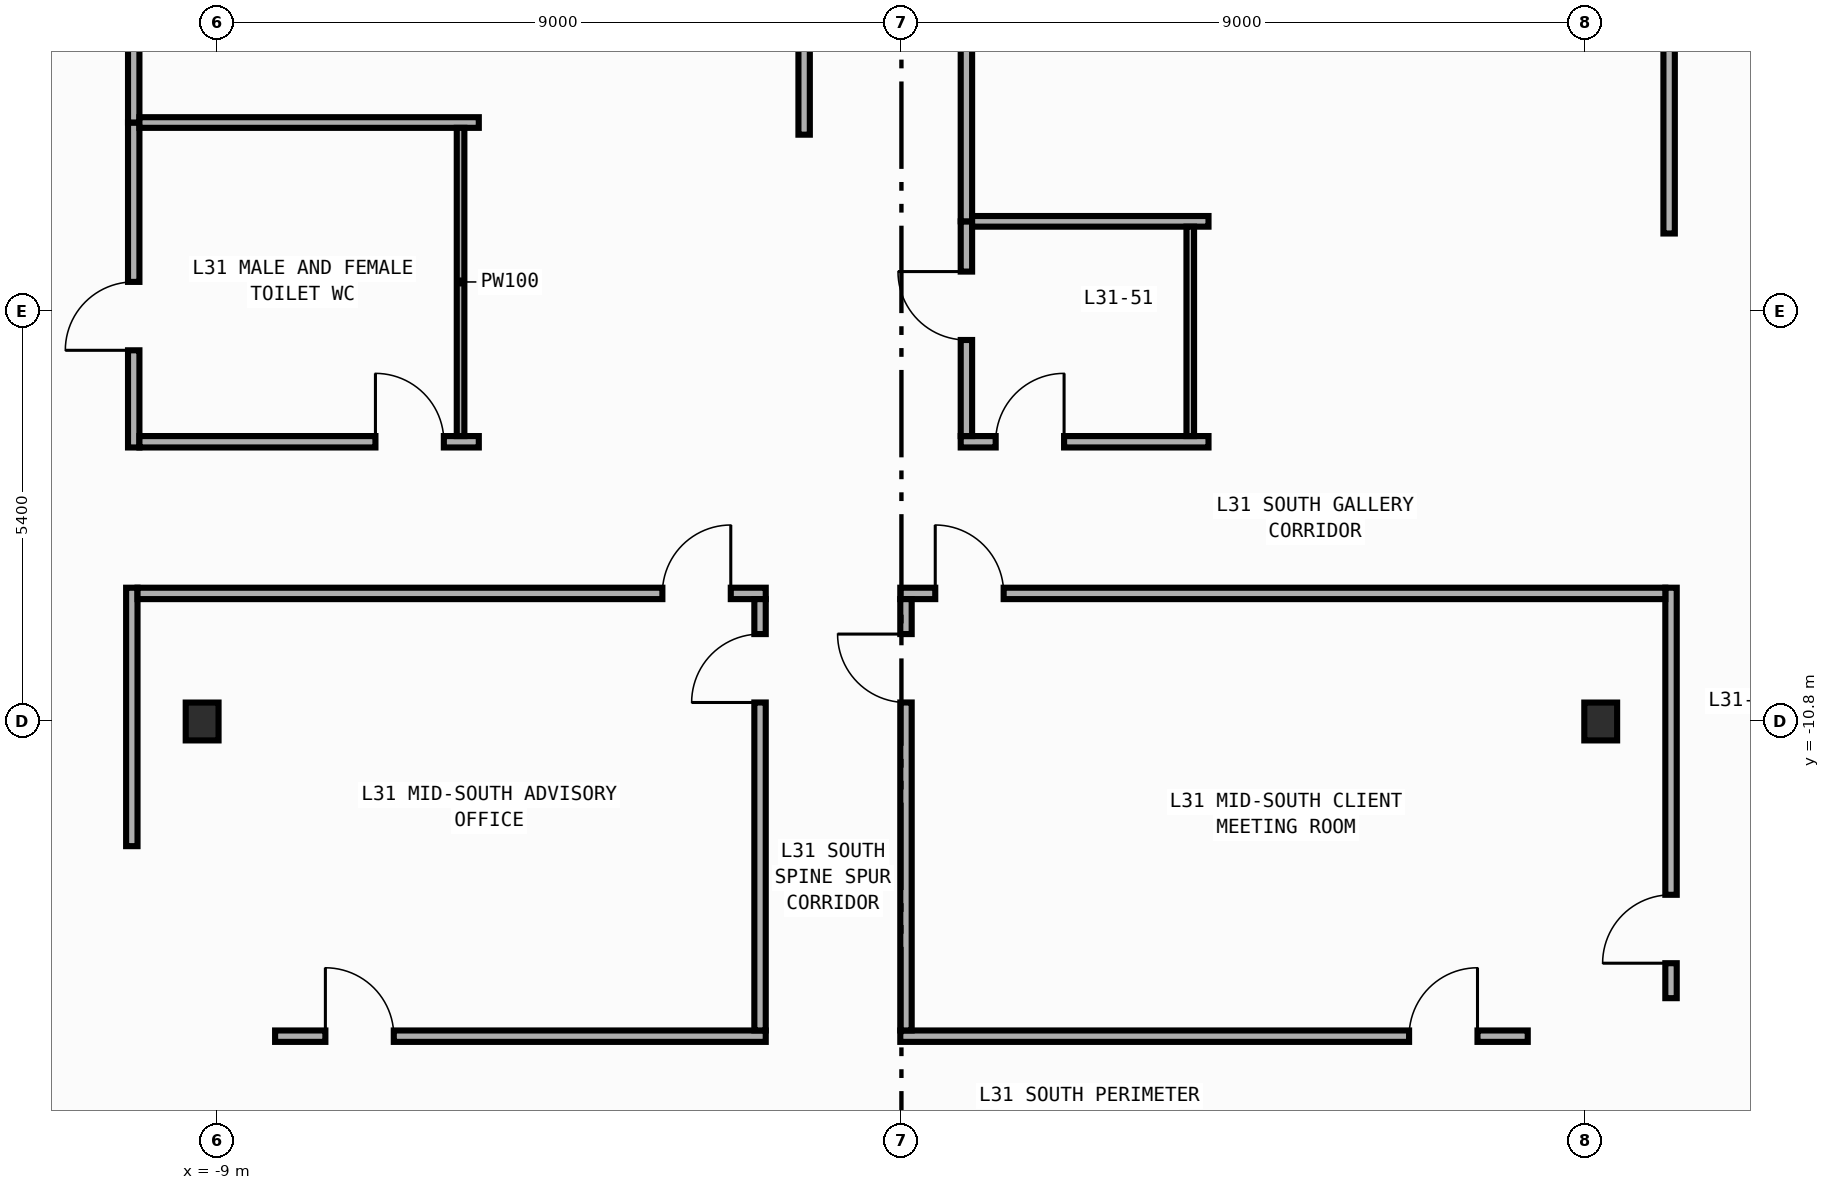
"""IFC4 building model, lengths in metres.
Left out: names, types, materials, properties, quantities, classifications, styles, units other than length and angle.
Written with IfcOpenShell. Run it as: python <this file> out.ifc"""

import sys

from ifc_helpers import new_model, si_unit, direction, frame, frame_2d, origin, origin_2d, place, context, subcontext, project, spatial, rectangle, i_section, extrude, element, fill, save


model = new_model("IFC4")
c1 = context("Model", 3, precision=1e-05, world=origin(), true_north=direction((0.0, 1.0)))
c2 = subcontext(c1, "Body", "Model", "MODEL_VIEW")
j1 = project(units=[si_unit("LENGTHUNIT", "METRE"), si_unit("PLANEANGLEUNIT", "RADIAN")], contexts=[c1])
p1 = place(None, origin())
s1 = spatial("IfcSite", under=j1, at=p1, CompositionType="ELEMENT")
p2 = place(p1, origin())
s2 = spatial("IfcBuilding", under=s1, at=p2, CompositionType="ELEMENT")
p3 = place(p2, frame((0.0, 0.0, 135.2)))
s3 = spatial("IfcBuildingStorey", under=s2, at=p3, CompositionType="ELEMENT", Elevation=135.2)
for number, where, z_axis, x_axis in (
    (1, (-9.2, -10.8, 0.0), (0.0, 0.0, 1.0), (1.0, 0.0, 0.0)),
    (2, (9.2, -10.8, 0.0), (0.0, 0.0, 1.0), (1.0, 0.0, 0.0)),
):
    element("IfcColumn", number, at=place(p3, frame(where, z_axis=z_axis, x_axis=x_axis)), inside=s3, PredefinedType="COLUMN", context=c2, shape_type="SweptSolid", body=[
        extrude(i_section(OverallWidth=0.432, OverallDepth=0.498, WebThickness=0.045, FlangeThickness=0.07, FilletRadius=0.022, at=origin_2d()), origin(), (0.0, 0.0, 1.0), 4.2),
    ])
p4 = place(p3, frame((-10.1, -7.195, 0.0), z_axis=(0.0, 0.0, 1.0), x_axis=(0.0, 1.0, 0.0)))
e3 = element("IfcWall", 3, at=p4, inside=s3, PredefinedType="PARTITIONING", context=c2, shape_type="SweptSolid", body=[
    extrude(rectangle(XDim=4.275, YDim=0.15, at=frame_2d((2.138, 0.0))), origin(), (0.0, 0.0, 1.0), 3.94),
])
p5 = place(p4, frame((1.278, 0.0, 0.0)))
e4 = element("IfcOpeningElement", 4, at=p5, cuts=e3, PredefinedType="OPENING", context=c2, shape_type="SweptSolid", body=[
    extrude(rectangle(XDim=0.9, YDim=2.15, at=frame_2d((0.45, 1.075))), frame((0.0, 0.085, 0.0), z_axis=(0.0, -1.0, 0.0), x_axis=(1.0, 0.0, 0.0)), (0.0, 0.0, 1.0), 0.17),
])
p6 = place(p3, frame((-10.1, -2.92, 0.0), z_axis=(0.0, 0.0, 1.0), x_axis=(0.0, 1.0, 0.0)))
e5 = element("IfcWall", 5, at=p6, inside=s3, PredefinedType="PARTITIONING", context=c2, shape_type="SweptSolid", body=[
    extrude(rectangle(XDim=8.915, YDim=0.15, at=frame_2d((4.458, 0.0))), origin(), (0.0, 0.0, 1.0), 3.94),
])
p7 = place(p6, frame((7.555, 0.0, 0.0)))
e6 = element("IfcOpeningElement", 6, at=p7, cuts=e5, PredefinedType="OPENING", context=c2, shape_type="SweptSolid", body=[
    extrude(rectangle(XDim=0.9, YDim=2.15, at=frame_2d((0.45, 1.075))), frame((0.0, 0.085, 0.0), z_axis=(0.0, -1.0, 0.0), x_axis=(1.0, 0.0, 0.0)), (0.0, 0.0, 1.0), 0.17),
])
p8 = place(p3, frame((-10.125, -12.44, 0.0), z_axis=(0.0, 0.0, 1.0), x_axis=(0.0, 1.0, 0.0)))
e7 = element("IfcWall", 7, at=p8, inside=s3, PredefinedType="PARTITIONING", context=c2, shape_type="SweptSolid", body=[
    extrude(rectangle(XDim=3.4, YDim=0.15, at=frame_2d((1.7, 0.0))), origin(), (0.0, 0.0, 1.0), 3.94),
])
p9 = place(p3, frame((10.1, -4.38, 0.0), z_axis=(0.0, 0.0, 1.0), x_axis=(0.0, 1.0, 0.0)))
e8 = element("IfcWall", 8, at=p9, inside=s3, PredefinedType="PARTITIONING", context=c2, shape_type="SweptSolid", body=[
    extrude(rectangle(XDim=10.375, YDim=0.15, at=frame_2d((5.188, 0.0))), origin(), (0.0, 0.0, 1.0), 3.94),
])
p10 = place(p9, frame((9.015, 0.0, 0.0)))
e9 = element("IfcOpeningElement", 9, at=p10, cuts=e8, PredefinedType="OPENING", context=c2, shape_type="SweptSolid", body=[
    extrude(rectangle(XDim=0.9, YDim=2.15, at=frame_2d((0.45, 1.075))), frame((0.0, 0.085, 0.0), z_axis=(0.0, -1.0, 0.0), x_axis=(1.0, 0.0, 0.0)), (0.0, 0.0, 1.0), 0.17),
])
p11 = place(p3, frame((10.125, -14.44, 0.0), z_axis=(0.0, 0.0, 1.0), x_axis=(0.0, 1.0, 0.0)))
e10 = element("IfcWall", 10, at=p11, inside=s3, PredefinedType="PARTITIONING", context=c2, shape_type="SweptSolid", body=[
    extrude(rectangle(XDim=5.4, YDim=0.15, at=frame_2d((2.7, 0.0))), origin(), (0.0, 0.0, 1.0), 3.94),
])
p12 = place(p11, frame((0.46, 0.0, 0.0)))
e11 = element("IfcOpeningElement", 11, at=p12, cuts=e10, PredefinedType="OPENING", context=c2, shape_type="SweptSolid", body=[
    extrude(rectangle(XDim=0.9, YDim=2.15, at=frame_2d((0.45, 1.075))), frame((0.0, 0.085, 0.0), z_axis=(0.0, -1.0, 0.0), x_axis=(1.0, 0.0, 0.0)), (0.0, 0.0, 1.0), 0.17),
])
p13 = place(p3, frame((0.78, -7.12, 0.0), z_axis=(0.0, 0.0, 1.0), x_axis=(1.0, 0.0, 0.0)))
e12 = element("IfcWall", 12, at=p13, inside=s3, PredefinedType="PARTITIONING", context=c2, shape_type="SweptSolid", body=[
    extrude(rectangle(XDim=3.26, YDim=0.15, at=frame_2d((1.63, 0.0))), origin(), (0.0, 0.0, 1.0), 3.94),
])
p14 = place(p13, frame((0.46, 0.0, 0.0)))
e13 = element("IfcOpeningElement", 13, at=p14, cuts=e12, PredefinedType="OPENING", context=c2, shape_type="SweptSolid", body=[
    extrude(rectangle(XDim=0.9, YDim=2.15, at=frame_2d((0.45, 1.075))), frame((0.0, 0.085, 0.0), z_axis=(0.0, -1.0, 0.0), x_axis=(1.0, 0.0, 0.0)), (0.0, 0.0, 1.0), 0.17),
])
p15 = place(p3, frame((-10.025, -7.12, 0.0), z_axis=(0.0, 0.0, 1.0), x_axis=(1.0, 0.0, 0.0)))
e14 = element("IfcWall", 14, at=p15, inside=s3, PredefinedType="PARTITIONING", context=c2, shape_type="SweptSolid", body=[
    extrude(rectangle(XDim=4.465, YDim=0.15, at=frame_2d((2.232, 0.0))), origin(), (0.0, 0.0, 1.0), 3.94),
])
p16 = place(p15, frame((3.105, 0.0, 0.0)))
e15 = element("IfcOpeningElement", 15, at=p16, cuts=e14, PredefinedType="OPENING", context=c2, shape_type="SweptSolid", body=[
    extrude(rectangle(XDim=0.9, YDim=2.15, at=frame_2d((0.45, 1.075))), frame((0.0, 0.085, 0.0), z_axis=(0.0, -1.0, 0.0), x_axis=(1.0, 0.0, 0.0)), (0.0, 0.0, 1.0), 0.17),
])
p17 = place(p3, frame((-10.05, -9.115, 0.0), z_axis=(0.0, 0.0, 1.0), x_axis=(1.0, 0.0, 0.0)))
e16 = element("IfcWall", 16, at=p17, inside=s3, PredefinedType="PARTITIONING", context=c2, shape_type="SweptSolid", body=[
    extrude(rectangle(XDim=8.265, YDim=0.15, at=frame_2d((4.133, 0.0))), origin(), (0.0, 0.0, 1.0), 3.94),
])
p18 = place(p17, frame((6.905, 0.0, 0.0)))
e17 = element("IfcOpeningElement", 17, at=p18, cuts=e16, PredefinedType="OPENING", context=c2, shape_type="SweptSolid", body=[
    extrude(rectangle(XDim=0.9, YDim=2.15, at=frame_2d((0.45, 1.075))), frame((0.0, 0.085, 0.0), z_axis=(0.0, -1.0, 0.0), x_axis=(1.0, 0.0, 0.0)), (0.0, 0.0, 1.0), 0.17),
])
p19 = place(p3, frame((-0.015, -9.115, 0.0), z_axis=(0.0, 0.0, 1.0), x_axis=(1.0, 0.0, 0.0)))
e18 = element("IfcWall", 18, at=p19, inside=s3, PredefinedType="PARTITIONING", context=c2, shape_type="SweptSolid", body=[
    extrude(rectangle(XDim=10.065, YDim=0.15, at=frame_2d((5.032, 0.0))), origin(), (0.0, 0.0, 1.0), 3.94),
])
p20 = place(p19, frame((0.46, 0.0, 0.0)))
e19 = element("IfcOpeningElement", 19, at=p20, cuts=e18, PredefinedType="OPENING", context=c2, shape_type="SweptSolid", body=[
    extrude(rectangle(XDim=0.9, YDim=2.15, at=frame_2d((0.45, 1.075))), frame((0.0, 0.085, 0.0), z_axis=(0.0, -1.0, 0.0), x_axis=(1.0, 0.0, 0.0)), (0.0, 0.0, 1.0), 0.17),
])
p21 = place(p3, frame((0.855, -7.045, 0.0), z_axis=(0.0, 0.0, 1.0), x_axis=(0.0, 1.0, 0.0)))
e20 = element("IfcWall", 20, at=p21, inside=s3, PredefinedType="PARTITIONING", context=c2, shape_type="SweptSolid", body=[
    extrude(rectangle(XDim=2.825, YDim=0.15, at=frame_2d((1.413, 0.0))), origin(), (0.0, 0.0, 1.0), 3.94),
])
p22 = place(p21, frame((1.264, 0.0, 0.0)))
e21 = element("IfcOpeningElement", 21, at=p22, cuts=e20, PredefinedType="OPENING", context=c2, shape_type="SweptSolid", body=[
    extrude(rectangle(XDim=0.9, YDim=2.15, at=frame_2d((0.45, 1.075))), frame((0.0, 0.085, 0.0), z_axis=(0.0, -1.0, 0.0), x_axis=(1.0, 0.0, 0.0)), (0.0, 0.0, 1.0), 0.17),
])
p23 = place(p3, frame((0.855, -4.22, 0.0), z_axis=(0.0, 0.0, 1.0), x_axis=(0.0, 1.0, 0.0)))
e22 = element("IfcWall", 22, at=p23, inside=s3, PredefinedType="PARTITIONING", context=c2, shape_type="SweptSolid", body=[
    extrude(rectangle(XDim=10.065, YDim=0.15, at=frame_2d((5.032, 0.0))), origin(), (0.0, 0.0, 1.0), 3.94),
])
p24 = place(p23, frame((8.705, 0.0, 0.0)))
e23 = element("IfcOpeningElement", 23, at=p24, cuts=e22, PredefinedType="OPENING", context=c2, shape_type="SweptSolid", body=[
    extrude(rectangle(XDim=0.9, YDim=2.15, at=frame_2d((0.45, 1.075))), frame((0.0, 0.085, 0.0), z_axis=(0.0, -1.0, 0.0), x_axis=(1.0, 0.0, 0.0)), (0.0, 0.0, 1.0), 0.17),
])
p25 = place(p3, frame((-1.28, -3.08, 0.0), z_axis=(0.0, 0.0, 1.0), x_axis=(0.0, 1.0, 0.0)))
e24 = element("IfcWall", 24, at=p25, inside=s3, PredefinedType="PARTITIONING", context=c2, shape_type="SweptSolid", body=[
    extrude(rectangle(XDim=8.925, YDim=0.15, at=frame_2d((4.462, 0.0))), origin(), (0.0, 0.0, 1.0), 3.94),
])
p26 = place(p25, frame((7.565, 0.0, 0.0)))
e25 = element("IfcOpeningElement", 25, at=p26, cuts=e24, PredefinedType="OPENING", context=c2, shape_type="SweptSolid", body=[
    extrude(rectangle(XDim=0.9, YDim=2.15, at=frame_2d((0.45, 1.075))), frame((0.0, 0.085, 0.0), z_axis=(0.0, -1.0, 0.0), x_axis=(1.0, 0.0, 0.0)), (0.0, 0.0, 1.0), 0.17),
])
p27 = place(p3, frame((-8.24, -14.94, 0.0), z_axis=(0.0, 0.0, 1.0), x_axis=(1.0, 0.0, 0.0)))
e26 = element("IfcWall", 26, at=p27, inside=s3, PredefinedType="PARTITIONING", context=c2, shape_type="SweptSolid", body=[
    extrude(rectangle(XDim=6.455, YDim=0.15, at=frame_2d((3.228, 0.0))), origin(), (0.0, 0.0, 1.0), 3.94),
])
p28 = place(p27, frame((0.662, 0.0, 0.0)))
e27 = element("IfcOpeningElement", 27, at=p28, cuts=e26, PredefinedType="OPENING", context=c2, shape_type="SweptSolid", body=[
    extrude(rectangle(XDim=0.9, YDim=2.15, at=frame_2d((0.45, 1.075))), frame((0.0, 0.085, 0.0), z_axis=(0.0, -1.0, 0.0), x_axis=(1.0, 0.0, 0.0)), (0.0, 0.0, 1.0), 0.17),
])
p29 = place(p3, frame((-0.015, -14.94, 0.0), z_axis=(0.0, 0.0, 1.0), x_axis=(1.0, 0.0, 0.0)))
e28 = element("IfcWall", 28, at=p29, inside=s3, PredefinedType="PARTITIONING", context=c2, shape_type="SweptSolid", body=[
    extrude(rectangle(XDim=8.255, YDim=0.15, at=frame_2d((4.127, 0.0))), origin(), (0.0, 0.0, 1.0), 3.94),
])
p30 = place(p29, frame((6.694, 0.0, 0.0)))
e29 = element("IfcOpeningElement", 29, at=p30, cuts=e28, PredefinedType="OPENING", context=c2, shape_type="SweptSolid", body=[
    extrude(rectangle(XDim=0.9, YDim=2.15, at=frame_2d((0.45, 1.075))), frame((0.0, 0.085, 0.0), z_axis=(0.0, -1.0, 0.0), x_axis=(1.0, 0.0, 0.0)), (0.0, 0.0, 1.0), 0.17),
])
p31 = place(p3, frame((-1.86, -14.865, 0.0), z_axis=(0.0, 0.0, 1.0), x_axis=(0.0, 1.0, 0.0)))
e30 = element("IfcWall", 30, at=p31, inside=s3, PredefinedType="PARTITIONING", context=c2, shape_type="SweptSolid", body=[
    extrude(rectangle(XDim=5.675, YDim=0.15, at=frame_2d((2.837, 0.0))), origin(), (0.0, 0.0, 1.0), 3.94),
])
p32 = place(p31, frame((4.315, 0.0, 0.0)))
e31 = element("IfcOpeningElement", 31, at=p32, cuts=e30, PredefinedType="OPENING", context=c2, shape_type="SweptSolid", body=[
    extrude(rectangle(XDim=0.9, YDim=2.15, at=frame_2d((0.45, 1.075))), frame((0.0, 0.085, 0.0), z_axis=(0.0, -1.0, 0.0), x_axis=(1.0, 0.0, 0.0)), (0.0, 0.0, 1.0), 0.17),
])
p33 = place(p3, frame((0.06, -14.865, 0.0), z_axis=(0.0, 0.0, 1.0), x_axis=(0.0, 1.0, 0.0)))
e32 = element("IfcWall", 32, at=p33, inside=s3, PredefinedType="PARTITIONING", context=c2, shape_type="SweptSolid", body=[
    extrude(rectangle(XDim=5.675, YDim=0.15, at=frame_2d((2.837, 0.0))), origin(), (0.0, 0.0, 1.0), 3.94),
])
p34 = place(p33, frame((4.315, 0.0, 0.0)))
e33 = element("IfcOpeningElement", 33, at=p34, cuts=e32, PredefinedType="OPENING", context=c2, shape_type="SweptSolid", body=[
    extrude(rectangle(XDim=0.9, YDim=2.15, at=frame_2d((0.45, 1.075))), frame((0.0, 0.085, 0.0), z_axis=(0.0, -1.0, 0.0), x_axis=(1.0, 0.0, 0.0)), (0.0, 0.0, 1.0), 0.17),
])
p35 = place(p3, frame((0.93, -4.22, 0.0), z_axis=(0.0, 0.0, 1.0), x_axis=(1.0, 0.0, 0.0)))
e34 = element("IfcWall", 34, at=p35, inside=s3, PredefinedType="PARTITIONING", context=c2, shape_type="SweptSolid", body=[
    extrude(rectangle(XDim=3.11, YDim=0.14, at=frame_2d((1.555, 0.0))), origin(), (0.0, 0.0, 1.0), 3.94),
])
p36 = place(p3, frame((-10.025, -2.92, 0.0), z_axis=(0.0, 0.0, 1.0), x_axis=(1.0, 0.0, 0.0)))
e35 = element("IfcWall", 35, at=p36, inside=s3, PredefinedType="PARTITIONING", context=c2, shape_type="SweptSolid", body=[
    extrude(rectangle(XDim=4.465, YDim=0.14, at=frame_2d((2.232, 0.0))), origin(), (0.0, 0.0, 1.0), 3.94),
])
p37 = place(p3, frame((3.8, -4.29, 0.0), z_axis=(0.0, 0.0, 1.0), x_axis=(0.0, -1.0, 0.0)))
e36 = element("IfcWall", 36, at=p37, inside=s3, PredefinedType="PARTITIONING", context=c2, shape_type="SweptSolid", body=[
    extrude(rectangle(XDim=2.755, YDim=0.1, at=frame_2d((1.377, 0.0))), origin(), (0.0, 0.0, 1.0), 3.94),
])
p38 = place(p3, frame((-5.8, -2.99, 0.0), z_axis=(0.0, 0.0, 1.0), x_axis=(0.0, -1.0, 0.0)))
e37 = element("IfcWall", 37, at=p38, inside=s3, PredefinedType="PARTITIONING", context=c2, shape_type="SweptSolid", body=[
    extrude(rectangle(XDim=4.055, YDim=0.1, at=frame_2d((2.027, 0.0))), origin(), (0.0, 0.0, 1.0), 3.94),
])
p39 = place(p5, origin())
e38 = element("IfcDoor", 38, at=p39, inside=s3, OperationType="SINGLE_SWING_LEFT", PredefinedType="DOOR", context=c2, shape_type="SweptSolid", body=[
    extrude(rectangle(XDim=0.9, YDim=2.15, at=frame_2d((0.45, 1.075))), frame((0.0, 0.025, 0.0), z_axis=(0.0, -1.0, 0.0), x_axis=(1.0, 0.0, 0.0)), (0.0, 0.0, 1.0), 0.05),
])
fill(e4, e38)
p40 = place(p12, origin())
e39 = element("IfcDoor", 39, at=p40, inside=s3, OperationType="SINGLE_SWING_LEFT", PredefinedType="DOOR", context=c2, shape_type="SweptSolid", body=[
    extrude(rectangle(XDim=0.9, YDim=2.15, at=frame_2d((0.45, 1.075))), frame((0.0, 0.025, 0.0), z_axis=(0.0, -1.0, 0.0), x_axis=(1.0, 0.0, 0.0)), (0.0, 0.0, 1.0), 0.05),
])
fill(e11, e39)
p41 = place(p14, origin())
e40 = element("IfcDoor", 40, at=p41, inside=s3, OperationType="SINGLE_SWING_RIGHT", PredefinedType="DOOR", context=c2, shape_type="SweptSolid", body=[
    extrude(rectangle(XDim=0.9, YDim=2.15, at=frame_2d((0.45, 1.075))), frame((0.0, 0.025, 0.0), z_axis=(0.0, -1.0, 0.0), x_axis=(1.0, 0.0, 0.0)), (0.0, 0.0, 1.0), 0.05),
])
fill(e13, e40)
p42 = place(p16, origin())
e41 = element("IfcDoor", 41, at=p42, inside=s3, OperationType="SINGLE_SWING_LEFT", PredefinedType="DOOR", context=c2, shape_type="SweptSolid", body=[
    extrude(rectangle(XDim=0.9, YDim=2.15, at=frame_2d((0.45, 1.075))), frame((0.0, 0.025, 0.0), z_axis=(0.0, -1.0, 0.0), x_axis=(1.0, 0.0, 0.0)), (0.0, 0.0, 1.0), 0.05),
])
fill(e15, e41)
p43 = place(p18, origin())
e42 = element("IfcDoor", 42, at=p43, inside=s3, OperationType="SINGLE_SWING_RIGHT", PredefinedType="DOOR", context=c2, shape_type="SweptSolid", body=[
    extrude(rectangle(XDim=0.9, YDim=2.15, at=frame_2d((0.45, 1.075))), frame((0.0, 0.025, 0.0), z_axis=(0.0, -1.0, 0.0), x_axis=(1.0, 0.0, 0.0)), (0.0, 0.0, 1.0), 0.05),
])
fill(e17, e42)
p44 = place(p20, origin())
e43 = element("IfcDoor", 43, at=p44, inside=s3, OperationType="SINGLE_SWING_LEFT", PredefinedType="DOOR", context=c2, shape_type="SweptSolid", body=[
    extrude(rectangle(XDim=0.9, YDim=2.15, at=frame_2d((0.45, 1.075))), frame((0.0, 0.025, 0.0), z_axis=(0.0, -1.0, 0.0), x_axis=(1.0, 0.0, 0.0)), (0.0, 0.0, 1.0), 0.05),
])
fill(e19, e43)
p45 = place(p22, origin())
e44 = element("IfcDoor", 44, at=p45, inside=s3, OperationType="SINGLE_SWING_RIGHT", PredefinedType="DOOR", context=c2, shape_type="SweptSolid", body=[
    extrude(rectangle(XDim=0.9, YDim=2.15, at=frame_2d((0.45, 1.075))), frame((0.0, 0.025, 0.0), z_axis=(0.0, -1.0, 0.0), x_axis=(1.0, 0.0, 0.0)), (0.0, 0.0, 1.0), 0.05),
])
fill(e21, e44)
p46 = place(p28, origin())
e45 = element("IfcDoor", 45, at=p46, inside=s3, OperationType="SINGLE_SWING_LEFT", PredefinedType="DOOR", context=c2, shape_type="SweptSolid", body=[
    extrude(rectangle(XDim=0.9, YDim=2.15, at=frame_2d((0.45, 1.075))), frame((0.0, 0.025, 0.0), z_axis=(0.0, -1.0, 0.0), x_axis=(1.0, 0.0, 0.0)), (0.0, 0.0, 1.0), 0.05),
])
fill(e27, e45)
p47 = place(p30, origin())
e46 = element("IfcDoor", 46, at=p47, inside=s3, OperationType="SINGLE_SWING_RIGHT", PredefinedType="DOOR", context=c2, shape_type="SweptSolid", body=[
    extrude(rectangle(XDim=0.9, YDim=2.15, at=frame_2d((0.45, 1.075))), frame((0.0, 0.025, 0.0), z_axis=(0.0, -1.0, 0.0), x_axis=(1.0, 0.0, 0.0)), (0.0, 0.0, 1.0), 0.05),
])
fill(e29, e46)
p48 = place(p32, origin())
e47 = element("IfcDoor", 47, at=p48, inside=s3, OperationType="SINGLE_SWING_LEFT", PredefinedType="DOOR", context=c2, shape_type="SweptSolid", body=[
    extrude(rectangle(XDim=0.9, YDim=2.15, at=frame_2d((0.45, 1.075))), frame((0.0, 0.025, 0.0), z_axis=(0.0, -1.0, 0.0), x_axis=(1.0, 0.0, 0.0)), (0.0, 0.0, 1.0), 0.05),
])
fill(e31, e47)
p49 = place(p34, origin())
e48 = element("IfcDoor", 48, at=p49, inside=s3, OperationType="SINGLE_SWING_RIGHT", PredefinedType="DOOR", context=c2, shape_type="SweptSolid", body=[
    extrude(rectangle(XDim=0.9, YDim=2.15, at=frame_2d((0.45, 1.075))), frame((0.0, 0.025, 0.0), z_axis=(0.0, -1.0, 0.0), x_axis=(1.0, 0.0, 0.0)), (0.0, 0.0, 1.0), 0.05),
])
fill(e33, e48)
save(model, sys.argv[1])
